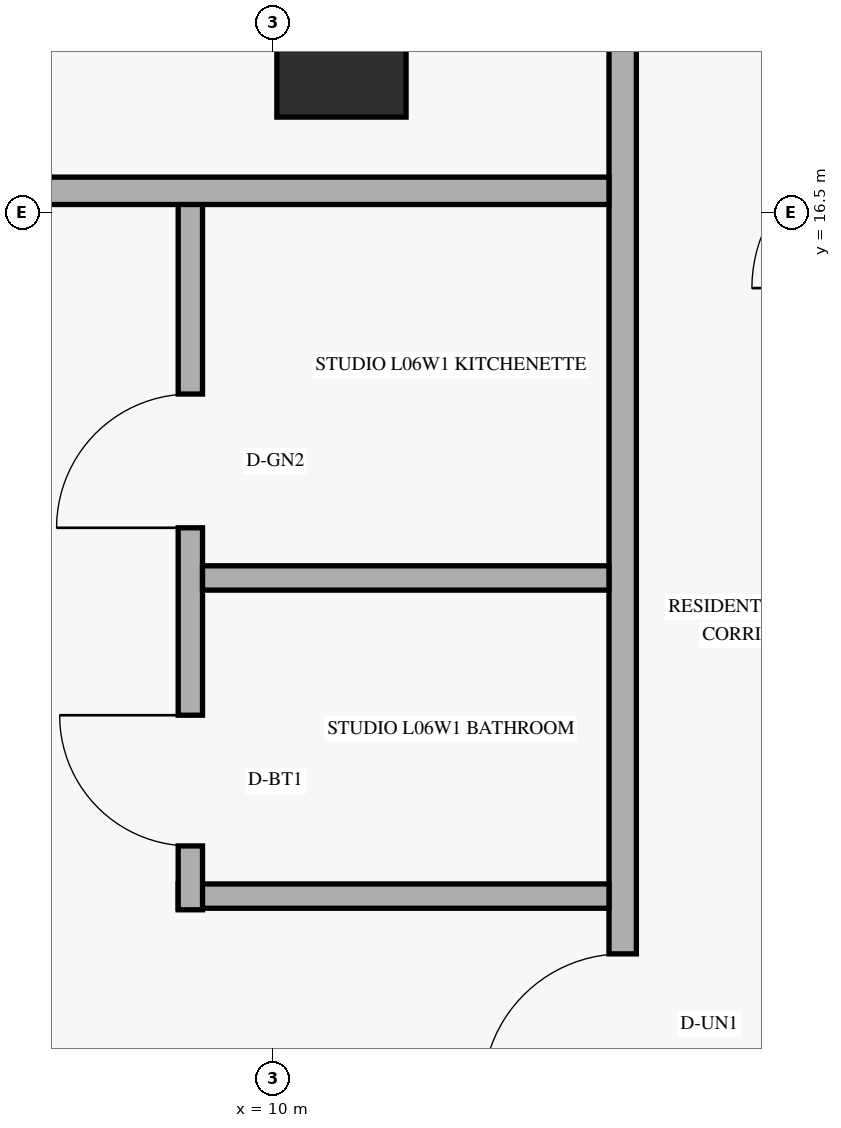
"""IFC4 building model, lengths in metres.
Left out: names, types, materials, properties, quantities, classifications, styles, units other than length and angle.
Written with IfcOpenShell. Run it as: python <this file> out.ifc"""

import sys

from ifc_helpers import new_model, si_unit, direction, frame, frame_2d, origin, origin_2d, place, context, subcontext, project, spatial, rectangle, extrude, element, fill, save


model = new_model("IFC4")
c1 = context("Model", 3, precision=1e-05, world=origin(), true_north=direction((0.0, 1.0)))
c2 = subcontext(c1, "Body", "Model", "MODEL_VIEW")
j1 = project(units=[si_unit("LENGTHUNIT", "METRE"), si_unit("PLANEANGLEUNIT", "RADIAN")], contexts=[c1])
p1 = place(None, origin())
s1 = spatial("IfcSite", under=j1, at=p1, CompositionType="ELEMENT")
p2 = place(p1, origin())
s2 = spatial("IfcBuilding", under=s1, at=p2, CompositionType="ELEMENT")
p3 = place(p2, frame((0.0, 0.0, 27.6)))
s3 = spatial("IfcBuildingStorey", under=s2, at=p3, CompositionType="ELEMENT", Elevation=27.6)
p4 = place(p3, frame((10.45, 17.55, 0.0), z_axis=(0.0, 0.0, 1.0), x_axis=(1.0, 0.0, 0.0)))
e1 = element("IfcColumn", 1, at=p4, inside=s3, PredefinedType="COLUMN", context=c2, shape_type="SweptSolid", body=[
    extrude(rectangle(XDim=0.85, YDim=0.85, at=origin_2d()), origin(), (0.0, 0.0, 1.0), 3.6),
])
p5 = place(p3, frame((12.3, 1.29, 0.0), z_axis=(0.0, 0.0, 1.0), x_axis=(0.0, 1.0, 0.0)))
e2 = element("IfcWall", 2, at=p5, inside=s3, PredefinedType="STANDARD", context=c2, shape_type="SweptSolid", body=[
    extrude(rectangle(XDim=45.42, YDim=0.18, at=frame_2d((22.71, 0.0))), origin(), (0.0, 0.0, 1.0), 2.649),
])
p6 = place(p5, frame((9.41, 0.0, 0.0)))
e3 = element("IfcOpeningElement", 3, at=p6, cuts=e2, PredefinedType="OPENING", context=c2, shape_type="SweptSolid", body=[
    extrude(rectangle(XDim=0.92, YDim=2.15, at=frame_2d((0.46, 1.075))), frame((0.0, 0.1, 0.0), z_axis=(0.0, -1.0, 0.0), x_axis=(1.0, 0.0, 0.0)), (0.0, 0.0, 1.0), 0.2),
])
p7 = place(p5, frame((21.05, 0.0, 0.0)))
e4 = element("IfcOpeningElement", 4, at=p7, cuts=e2, PredefinedType="OPENING", context=c2, shape_type="SweptSolid", body=[
    extrude(rectangle(XDim=0.92, YDim=2.15, at=frame_2d((0.46, 1.075))), frame((0.0, 0.1, 0.0), z_axis=(0.0, -1.0, 0.0), x_axis=(1.0, 0.0, 0.0)), (0.0, 0.0, 1.0), 0.2),
])
p8 = place(p5, frame((36.491, 0.0, 0.0)))
e5 = element("IfcOpeningElement", 5, at=p8, cuts=e2, PredefinedType="OPENING", context=c2, shape_type="SweptSolid", body=[
    extrude(rectangle(XDim=0.92, YDim=2.15, at=frame_2d((0.46, 1.075))), frame((0.0, 0.1, 0.0), z_axis=(0.0, -1.0, 0.0), x_axis=(1.0, 0.0, 0.0)), (0.0, 0.0, 1.0), 0.2),
])
p9 = place(p3, frame((9.376, 12.0, 0.0), z_axis=(0.0, 0.0, 1.0), x_axis=(1.0, 0.0, 0.0)))
e6 = element("IfcWall", 6, at=p9, inside=s3, PredefinedType="PLUMBINGWALL", context=c2, shape_type="SweptSolid", body=[
    extrude(rectangle(XDim=2.834, YDim=0.16, at=frame_2d((1.417, 0.0))), origin(), (0.0, 0.0, 1.0), 2.649),
])
p10 = place(p3, frame((9.456, 11.91, 0.0), z_axis=(0.0, 0.0, 1.0), x_axis=(0.0, 1.0, 0.0)))
e7 = element("IfcWall", 7, at=p10, inside=s3, PredefinedType="PLUMBINGWALL", context=c2, shape_type="SweptSolid", body=[
    extrude(rectangle(XDim=4.73, YDim=0.16, at=frame_2d((2.365, 0.0))), origin(), (0.0, 0.0, 1.0), 2.932),
])
p11 = place(p10, frame((0.42, 0.0, 0.0)))
e8 = element("IfcOpeningElement", 8, at=p11, cuts=e7, PredefinedType="OPENING", context=c2, shape_type="SweptSolid", body=[
    extrude(rectangle(XDim=0.86, YDim=2.12, at=frame_2d((0.43, 1.06))), frame((0.0, 0.09, 0.0), z_axis=(0.0, -1.0, 0.0), x_axis=(1.0, 0.0, 0.0)), (0.0, 0.0, 1.0), 0.18),
])
p12 = place(p10, frame((2.513, 0.0, 0.0)))
e9 = element("IfcOpeningElement", 9, at=p12, cuts=e7, PredefinedType="OPENING", context=c2, shape_type="SweptSolid", body=[
    extrude(rectangle(XDim=0.88, YDim=2.12, at=frame_2d((0.44, 1.06))), frame((0.0, 0.09, 0.0), z_axis=(0.0, -1.0, 0.0), x_axis=(1.0, 0.0, 0.0)), (0.0, 0.0, 1.0), 0.18),
])
p13 = place(p3, frame((9.536, 14.093, 0.0), z_axis=(0.0, 0.0, 1.0), x_axis=(1.0, 0.0, 0.0)))
e10 = element("IfcWall", 10, at=p13, inside=s3, PredefinedType="PLUMBINGWALL", context=c2, shape_type="SweptSolid", body=[
    extrude(rectangle(XDim=2.674, YDim=0.16, at=frame_2d((1.337, 0.0))), origin(), (0.0, 0.0, 1.0), 2.649),
])
p14 = place(p3, frame((2.09, 16.64, 0.0), z_axis=(0.0, 0.0, 1.0), x_axis=(1.0, 0.0, 0.0)))
e11 = element("IfcWall", 11, at=p14, inside=s3, PredefinedType="PARTITIONING", context=c2, shape_type="SweptSolid", body=[
    extrude(rectangle(XDim=10.12, YDim=0.18, at=frame_2d((5.06, 0.0))), origin(), (0.0, 0.0, 1.0), 2.649),
])
p15 = place(p6, origin())
e12 = element("IfcDoor", 12, at=p15, inside=s3, OperationType="SINGLE_SWING_LEFT", PredefinedType="DOOR", context=c2, shape_type="SweptSolid", body=[
    extrude(rectangle(XDim=0.92, YDim=2.15, at=frame_2d((0.46, 1.075))), frame((0.0, 0.025, 0.0), z_axis=(0.0, -1.0, 0.0), x_axis=(1.0, 0.0, 0.0)), (0.0, 0.0, 1.0), 0.05),
])
fill(e3, e12)
p16 = place(p11, origin())
e13 = element("IfcDoor", 13, at=p16, inside=s3, OperationType="SINGLE_SWING_RIGHT", PredefinedType="DOOR", context=c2, shape_type="SweptSolid", body=[
    extrude(rectangle(XDim=0.86, YDim=2.12, at=frame_2d((0.43, 1.06))), frame((0.0, 0.025, 0.0), z_axis=(0.0, -1.0, 0.0), x_axis=(1.0, 0.0, 0.0)), (0.0, 0.0, 1.0), 0.05),
])
fill(e8, e13)
p17 = place(p12, origin())
e14 = element("IfcDoor", 14, at=p17, inside=s3, OperationType="SINGLE_SWING_LEFT", PredefinedType="DOOR", context=c2, shape_type="SweptSolid", body=[
    extrude(rectangle(XDim=0.88, YDim=2.12, at=frame_2d((0.44, 1.06))), frame((0.0, 0.025, 0.0), z_axis=(0.0, -1.0, 0.0), x_axis=(1.0, 0.0, 0.0)), (0.0, 0.0, 1.0), 0.05),
])
fill(e9, e14)
save(model, sys.argv[1])
